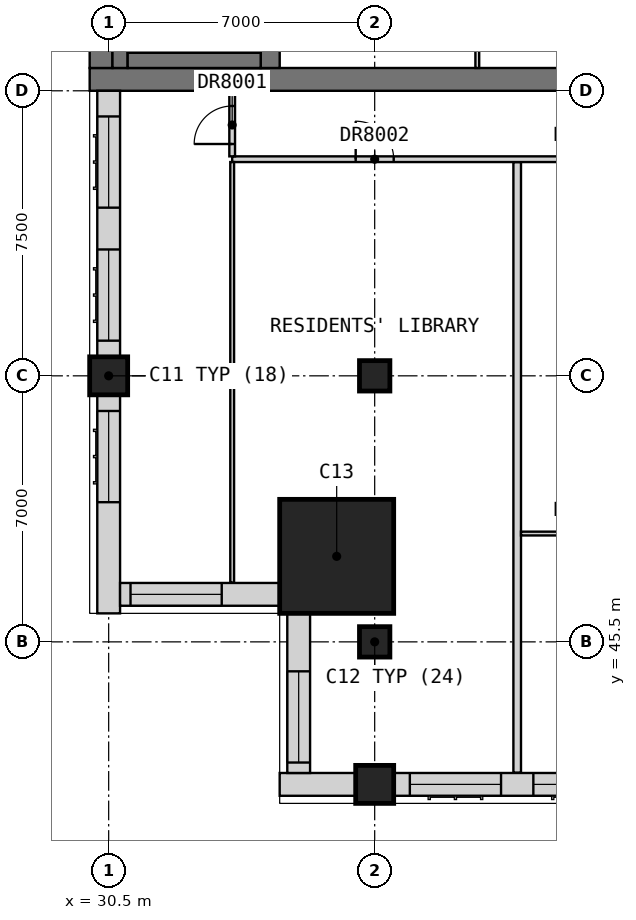
"""IFC4 building model, lengths in metres.
Left out: names, types, materials, properties, quantities, classifications, styles, units other than length and angle.
Written with IfcOpenShell. Run it as: python <this file> out.ifc"""

import sys

from ifc_helpers import new_model, si_unit, direction, frame, frame_2d, origin, origin_2d, place, context, subcontext, project, spatial, rectangle, extrude, element, fill, save


model = new_model("IFC4")
c1 = context("Model", 3, precision=1e-05, world=origin(), true_north=direction((0.0, 1.0)))
c2 = subcontext(c1, "Body", "Model", "MODEL_VIEW")
j1 = project(units=[si_unit("LENGTHUNIT", "METRE"), si_unit("PLANEANGLEUNIT", "RADIAN")], contexts=[c1])
p1 = place(None, origin())
s1 = spatial("IfcSite", under=j1, at=p1, CompositionType="ELEMENT")
p2 = place(p1, origin())
s2 = spatial("IfcBuilding", under=s1, at=p2, CompositionType="ELEMENT")
p3 = place(p2, frame((0.0, 0.0, 233.7)))
s3 = spatial("IfcBuildingStorey", under=s2, at=p3, CompositionType="ELEMENT", Elevation=233.7)
for number, where, z_axis, x_axis in (
    (1, (37.5, 41.75, 0.0), (0.0, 0.0, 1.0), (1.0, 0.0, 0.0)),
    (2, (30.5, 52.5, 0.0), (0.0, 0.0, 1.0), (1.0, 0.0, 0.0)),
):
    element("IfcColumn", number, at=place(p3, frame(where, z_axis=z_axis, x_axis=x_axis)), inside=s3, PredefinedType="COLUMN", context=c2, shape_type="SweptSolid", body=[
        extrude(rectangle(XDim=1.0, YDim=1.0, at=origin_2d()), origin(), (0.0, 0.0, 1.0), 3.5),
    ])
for number, where, z_axis, x_axis in (
    (3, (37.5, 45.5, 0.0), (0.0, 0.0, 1.0), (1.0, 0.0, 0.0)),
    (4, (37.5, 52.5, 0.0), (0.0, 0.0, 1.0), (1.0, 0.0, 0.0)),
):
    element("IfcColumn", number, at=place(p3, frame(where, z_axis=z_axis, x_axis=x_axis)), inside=s3, PredefinedType="COLUMN", context=c2, shape_type="SweptSolid", body=[
        extrude(rectangle(XDim=0.8, YDim=0.8, at=origin_2d()), origin(), (0.0, 0.0, 1.0), 3.5),
    ])
p4 = place(p3, frame((36.5, 47.75, 0.0), z_axis=(0.0, 0.0, 1.0), x_axis=(1.0, 0.0, 0.0)))
e5 = element("IfcColumn", 5, at=p4, inside=s3, PredefinedType="COLUMN", context=c2, shape_type="SweptSolid", body=[
    extrude(rectangle(XDim=3.0, YDim=3.0, at=origin_2d()), origin(), (0.0, 0.0, 1.0), 3.5),
])
p5 = place(p3, frame((30.0, 60.3, 0.0), z_axis=(0.0, 0.0, 1.0), x_axis=(1.0, 0.0, 0.0)))
e6 = element("IfcWall", 6, at=p5, inside=s3, PredefinedType="SHEAR", context=c2, shape_type="SweptSolid", body=[
    extrude(rectangle(XDim=30.0, YDim=0.6, at=frame_2d((15.0, 0.0))), origin(), (0.0, 0.0, 1.0), 3.5),
])
p6 = place(p5, frame((21.9, 0.0, 0.0)))
e7 = element("IfcOpeningElement", 7, at=p6, cuts=e6, PredefinedType="OPENING", context=c2, shape_type="SweptSolid", body=[
    extrude(rectangle(XDim=1.8, YDim=2.1, at=frame_2d((0.9, 1.05))), frame((0.0, 0.31, 0.0), z_axis=(0.0, -1.0, 0.0), x_axis=(1.0, 0.0, 0.0)), (0.0, 0.0, 1.0), 0.62),
])
p7 = place(p5, frame((26.5, 0.0, 0.0)))
e8 = element("IfcOpeningElement", 8, at=p7, cuts=e6, PredefinedType="OPENING", context=c2, shape_type="SweptSolid", body=[
    extrude(rectangle(XDim=1.2, YDim=2.1, at=frame_2d((0.6, 1.05))), frame((0.0, 0.31, 0.0), z_axis=(0.0, -1.0, 0.0), x_axis=(1.0, 0.0, 0.0)), (0.0, 0.0, 1.0), 0.62),
])
p8 = place(p3, frame((30.3, 60.6, 0.0), z_axis=(0.0, 0.0, 1.0), x_axis=(0.0, 1.0, 0.0)))
e9 = element("IfcWall", 9, at=p8, inside=s3, PredefinedType="SHEAR", context=c2, shape_type="SweptSolid", body=[
    extrude(rectangle(XDim=21.3, YDim=0.6, at=frame_2d((10.65, 0.0))), origin(), (0.0, 0.0, 1.0), 3.5),
])
p9 = place(p3, frame((34.75, 60.6, 0.0), z_axis=(0.0, 0.0, 1.0), x_axis=(0.0, 1.0, 0.0)))
e10 = element("IfcWall", 10, at=p9, inside=s3, PredefinedType="SHEAR", context=c2, shape_type="SweptSolid", body=[
    extrude(rectangle(XDim=3.6, YDim=0.5, at=frame_2d((1.8, 0.0))), origin(), (0.0, 0.0, 1.0), 3.5),
])
p10 = place(p3, frame((35.0, 41.75, 0.0), z_axis=(0.0, 0.0, 1.0), x_axis=(1.0, 0.0, 0.0)))
e11 = element("IfcWall", 11, at=p10, inside=s3, PredefinedType="SOLIDWALL", context=c2, shape_type="SweptSolid", body=[
    extrude(rectangle(XDim=2.0, YDim=0.6, at=frame_2d((1.0, 0.0))), origin(), (0.0, 0.0, 1.0), 3.25),
])
p11 = place(p3, frame((38.0, 41.75, 0.0), z_axis=(0.0, 0.0, 1.0), x_axis=(1.0, 0.0, 0.0)))
e12 = element("IfcWall", 12, at=p11, inside=s3, PredefinedType="SOLIDWALL", context=c2, shape_type="SweptSolid", body=[
    extrude(rectangle(XDim=6.5, YDim=0.6, at=frame_2d((3.25, 0.0))), origin(), (0.0, 0.0, 1.0), 2.75),
])
p12 = place(p11, frame((0.425, 0.0, 0.8)))
e13 = element("IfcOpeningElement", 13, at=p12, cuts=e12, PredefinedType="OPENING", context=c2, shape_type="SweptSolid", body=[
    extrude(rectangle(XDim=2.4, YDim=1.8, at=frame_2d((1.2, 0.9))), frame((0.0, 0.31, 0.0), z_axis=(0.0, -1.0, 0.0), x_axis=(1.0, 0.0, 0.0)), (0.0, 0.0, 1.0), 0.62),
])
p13 = place(p11, frame((3.675, 0.0, 0.8)))
e14 = element("IfcOpeningElement", 14, at=p13, cuts=e12, PredefinedType="OPENING", context=c2, shape_type="SweptSolid", body=[
    extrude(rectangle(XDim=2.4, YDim=1.8, at=frame_2d((1.2, 0.9))), frame((0.0, 0.31, 0.0), z_axis=(0.0, -1.0, 0.0), x_axis=(1.0, 0.0, 0.0)), (0.0, 0.0, 1.0), 0.62),
])
p14 = place(p3, frame((30.5, 60.0, 0.0), z_axis=(0.0, 0.0, 1.0), x_axis=(0.0, -1.0, 0.0)))
e15 = element("IfcWall", 15, at=p14, inside=s3, PredefinedType="SOLIDWALL", context=c2, shape_type="SweptSolid", body=[
    extrude(rectangle(XDim=7.0, YDim=0.6, at=frame_2d((3.5, 0.0))), origin(), (0.0, 0.0, 1.0), 3.25),
])
p15 = place(p14, frame((4.175, 0.0, 0.8)))
e16 = element("IfcOpeningElement", 16, at=p15, cuts=e15, PredefinedType="OPENING", context=c2, shape_type="SweptSolid", body=[
    extrude(rectangle(XDim=2.4, YDim=1.8, at=frame_2d((1.2, 0.9))), frame((0.0, 0.31, 0.0), z_axis=(0.0, -1.0, 0.0), x_axis=(1.0, 0.0, 0.0)), (0.0, 0.0, 1.0), 0.62),
])
p16 = place(p14, frame((0.675, 0.0, 0.8)))
e17 = element("IfcOpeningElement", 17, at=p16, cuts=e15, PredefinedType="OPENING", context=c2, shape_type="SweptSolid", body=[
    extrude(rectangle(XDim=2.4, YDim=1.8, at=frame_2d((1.2, 0.9))), frame((0.0, 0.31, 0.0), z_axis=(0.0, -1.0, 0.0), x_axis=(1.0, 0.0, 0.0)), (0.0, 0.0, 1.0), 0.62),
])
p17 = place(p3, frame((30.5, 52.0, 0.0), z_axis=(0.0, 0.0, 1.0), x_axis=(0.0, -1.0, 0.0)))
e18 = element("IfcWall", 18, at=p17, inside=s3, PredefinedType="SOLIDWALL", context=c2, shape_type="SweptSolid", body=[
    extrude(rectangle(XDim=5.75, YDim=0.6, at=frame_2d((2.875, 0.0))), origin(), (0.0, 0.0, 1.0), 2.75),
])
p18 = place(p17, frame((0.425, 0.0, 0.8)))
e19 = element("IfcOpeningElement", 19, at=p18, cuts=e18, PredefinedType="OPENING", context=c2, shape_type="SweptSolid", body=[
    extrude(rectangle(XDim=2.4, YDim=1.8, at=frame_2d((1.2, 0.9))), frame((0.0, 0.31, 0.0), z_axis=(0.0, -1.0, 0.0), x_axis=(1.0, 0.0, 0.0)), (0.0, 0.0, 1.0), 0.62),
])
p19 = place(p3, frame((30.8, 46.75, 0.0), z_axis=(0.0, 0.0, 1.0), x_axis=(1.0, 0.0, 0.0)))
e20 = element("IfcWall", 20, at=p19, inside=s3, PredefinedType="SOLIDWALL", context=c2, shape_type="SweptSolid", body=[
    extrude(rectangle(XDim=4.2, YDim=0.6, at=frame_2d((2.1, 0.0))), origin(), (0.0, 0.0, 1.0), 3.25),
])
p20 = place(p19, frame((0.275, 0.0, 0.8)))
e21 = element("IfcOpeningElement", 21, at=p20, cuts=e20, PredefinedType="OPENING", context=c2, shape_type="SweptSolid", body=[
    extrude(rectangle(XDim=2.4, YDim=1.8, at=frame_2d((1.2, 0.9))), frame((0.0, 0.31, 0.0), z_axis=(0.0, -1.0, 0.0), x_axis=(1.0, 0.0, 0.0)), (0.0, 0.0, 1.0), 0.62),
])
p21 = place(p3, frame((35.5, 46.25, 0.0), z_axis=(0.0, 0.0, 1.0), x_axis=(0.0, -1.0, 0.0)))
e22 = element("IfcWall", 22, at=p21, inside=s3, PredefinedType="SOLIDWALL", context=c2, shape_type="SweptSolid", body=[
    extrude(rectangle(XDim=4.2, YDim=0.6, at=frame_2d((2.1, 0.0))), origin(), (0.0, 0.0, 1.0), 3.25),
])
p22 = place(p21, frame((1.525, 0.0, 0.8)))
e23 = element("IfcOpeningElement", 23, at=p22, cuts=e22, PredefinedType="OPENING", context=c2, shape_type="SweptSolid", body=[
    extrude(rectangle(XDim=2.4, YDim=1.8, at=frame_2d((1.2, 0.9))), frame((0.0, 0.31, 0.0), z_axis=(0.0, -1.0, 0.0), x_axis=(1.0, 0.0, 0.0)), (0.0, 0.0, 1.0), 0.62),
])
p23 = place(p3, frame((40.2, 60.6, 0.0), z_axis=(0.0, 0.0, 1.0), x_axis=(0.0, 1.0, 0.0)))
e24 = element("IfcWall", 24, at=p23, inside=s3, PredefinedType="PARTITIONING", context=c2, shape_type="SweptSolid", body=[
    extrude(rectangle(XDim=3.4, YDim=0.1, at=frame_2d((1.7, 0.0))), origin(), (0.0, 0.0, 1.0), 3.25),
])
p24 = place(p3, frame((30.8, 60.6, 0.0), z_axis=(0.0, 0.0, 1.0), x_axis=(0.0, 1.0, 0.0)))
e25 = element("IfcWall", 25, at=p24, inside=s3, PredefinedType="SOLIDWALL", context=c2, shape_type="SweptSolid", body=[
    extrude(rectangle(XDim=21.3, YDim=0.4, at=frame_2d((10.65, 0.0))), origin(), (0.0, 0.0, 1.0), 3.25),
])
p25 = place(p3, frame((31.0, 60.8, 0.0), z_axis=(0.0, 0.0, 1.0), x_axis=(1.0, 0.0, 0.0)))
e26 = element("IfcWall", 26, at=p25, inside=s3, PredefinedType="SOLIDWALL", context=c2, shape_type="SweptSolid", body=[
    extrude(rectangle(XDim=3.5, YDim=0.4, at=frame_2d((1.75, 0.0))), origin(), (0.0, 0.0, 1.0), 3.25),
])
p26 = place(p3, frame((41.25, 42.06, 0.0), z_axis=(0.0, 0.0, 1.0), x_axis=(0.0, 1.0, 0.0)))
e27 = element("IfcWall", 27, at=p26, inside=s3, PredefinedType="PARTITIONING", context=c2, shape_type="SweptSolid", body=[
    extrude(rectangle(XDim=16.065, YDim=0.2, at=frame_2d((8.032, 0.0))), origin(), (0.0, 0.0, 1.0), 3.25),
])
p27 = place(p3, frame((33.75, 58.2, 0.0), z_axis=(0.0, 0.0, 1.0), x_axis=(1.0, 0.0, 0.0)))
e28 = element("IfcWall", 28, at=p27, inside=s3, PredefinedType="PARTITIONING", context=c2, shape_type="SweptSolid", body=[
    extrude(rectangle(XDim=28.05, YDim=0.15, at=frame_2d((14.025, 0.0))), origin(), (0.0, 0.0, 1.0), 3.25),
])
p28 = place(p27, frame((3.25, 0.0, 0.0)))
e29 = element("IfcOpeningElement", 29, at=p28, cuts=e28, PredefinedType="OPENING", context=c2, shape_type="SweptSolid", body=[
    extrude(rectangle(XDim=1.0, YDim=2.1, at=frame_2d((0.5, 1.05))), frame((0.0, 0.085, 0.0), z_axis=(0.0, -1.0, 0.0), x_axis=(1.0, 0.0, 0.0)), (0.0, 0.0, 1.0), 0.17),
])
p29 = place(p27, frame((8.925, 0.0, 0.0)))
e30 = element("IfcOpeningElement", 30, at=p29, cuts=e28, PredefinedType="OPENING", context=c2, shape_type="SweptSolid", body=[
    extrude(rectangle(XDim=0.9, YDim=2.1, at=frame_2d((0.45, 1.05))), frame((0.0, 0.085, 0.0), z_axis=(0.0, -1.0, 0.0), x_axis=(1.0, 0.0, 0.0)), (0.0, 0.0, 1.0), 0.17),
])
p30 = place(p27, frame((20.175, 0.0, 0.0)))
e31 = element("IfcOpeningElement", 31, at=p30, cuts=e28, PredefinedType="OPENING", context=c2, shape_type="SweptSolid", body=[
    extrude(rectangle(XDim=0.9, YDim=2.1, at=frame_2d((0.45, 1.05))), frame((0.0, 0.085, 0.0), z_axis=(0.0, -1.0, 0.0), x_axis=(1.0, 0.0, 0.0)), (0.0, 0.0, 1.0), 0.17),
])
p31 = place(p27, frame((26.7, 0.0, 0.0)))
e32 = element("IfcOpeningElement", 32, at=p31, cuts=e28, PredefinedType="OPENING", context=c2, shape_type="SweptSolid", body=[
    extrude(rectangle(XDim=0.9, YDim=2.1, at=frame_2d((0.45, 1.05))), frame((0.0, 0.085, 0.0), z_axis=(0.0, -1.0, 0.0), x_axis=(1.0, 0.0, 0.0)), (0.0, 0.0, 1.0), 0.17),
])
p32 = place(p3, frame((33.75, 58.275, 0.0), z_axis=(0.0, 0.0, 1.0), x_axis=(0.0, 1.0, 0.0)))
e33 = element("IfcWall", 33, at=p32, inside=s3, PredefinedType="PARTITIONING", context=c2, shape_type="SweptSolid", body=[
    extrude(rectangle(XDim=1.725, YDim=0.15, at=frame_2d((0.863, 0.0))), origin(), (0.0, 0.0, 1.0), 3.25),
])
p33 = place(p32, frame((0.325, 0.0, 0.0)))
e34 = element("IfcOpeningElement", 34, at=p33, cuts=e33, PredefinedType="OPENING", context=c2, shape_type="SweptSolid", body=[
    extrude(rectangle(XDim=1.0, YDim=2.1, at=frame_2d((0.5, 1.05))), frame((0.0, 0.085, 0.0), z_axis=(0.0, -1.0, 0.0), x_axis=(1.0, 0.0, 0.0)), (0.0, 0.0, 1.0), 0.17),
])
p34 = place(p3, frame((41.35, 48.35, 0.0), z_axis=(0.0, 0.0, 1.0), x_axis=(1.0, 0.0, 0.0)))
e35 = element("IfcWall", 35, at=p34, inside=s3, PredefinedType="PARTITIONING", context=c2, shape_type="SweptSolid", body=[
    extrude(rectangle(XDim=18.55, YDim=0.1, at=frame_2d((9.275, 0.0))), origin(), (0.0, 0.0, 1.0), 3.25),
])
p35 = place(p34, frame((1.325, 0.0, 0.0)))
e36 = element("IfcOpeningElement", 36, at=p35, cuts=e35, PredefinedType="OPENING", context=c2, shape_type="SweptSolid", body=[
    extrude(rectangle(XDim=0.9, YDim=2.1, at=frame_2d((0.45, 1.05))), frame((0.0, 0.06, 0.0), z_axis=(0.0, -1.0, 0.0), x_axis=(1.0, 0.0, 0.0)), (0.0, 0.0, 1.0), 0.12),
])
p36 = place(p34, frame((8.825, 0.0, 0.0)))
e37 = element("IfcOpeningElement", 37, at=p36, cuts=e35, PredefinedType="OPENING", context=c2, shape_type="SweptSolid", body=[
    extrude(rectangle(XDim=0.9, YDim=2.1, at=frame_2d((0.45, 1.05))), frame((0.0, 0.06, 0.0), z_axis=(0.0, -1.0, 0.0), x_axis=(1.0, 0.0, 0.0)), (0.0, 0.0, 1.0), 0.12),
])
p37 = place(p34, frame((12.575, 0.0, 0.0)))
e38 = element("IfcOpeningElement", 38, at=p37, cuts=e35, PredefinedType="OPENING", context=c2, shape_type="SweptSolid", body=[
    extrude(rectangle(XDim=0.9, YDim=2.1, at=frame_2d((0.45, 1.05))), frame((0.0, 0.06, 0.0), z_axis=(0.0, -1.0, 0.0), x_axis=(1.0, 0.0, 0.0)), (0.0, 0.0, 1.0), 0.12),
])
p38 = place(p3, frame((33.75, 47.06, 0.0), z_axis=(0.0, 0.0, 1.0), x_axis=(0.0, 1.0, 0.0)))
e39 = element("IfcWall", 39, at=p38, inside=s3, PredefinedType="PARTITIONING", context=c2, shape_type="SweptSolid", body=[
    extrude(rectangle(XDim=11.065, YDim=0.1, at=frame_2d((5.532, 0.0))), origin(), (0.0, 0.0, 1.0), 3.25),
])
p39 = place(p12, origin())
e40 = element("IfcWindow", 40, at=p39, inside=s3, PartitioningType="SINGLE_PANEL", PredefinedType="WINDOW", context=c2, shape_type="SweptSolid", body=[
    extrude(rectangle(XDim=2.4, YDim=1.8, at=frame_2d((1.2, 0.9))), frame((0.0, -0.07, 0.0), z_axis=(0.0, -1.0, 0.0), x_axis=(1.0, 0.0, 0.0)), (0.0, 0.0, 1.0), 0.06),
])
fill(e13, e40)
p40 = place(p13, origin())
e41 = element("IfcWindow", 41, at=p40, inside=s3, PartitioningType="SINGLE_PANEL", PredefinedType="WINDOW", context=c2, shape_type="SweptSolid", body=[
    extrude(rectangle(XDim=2.4, YDim=1.8, at=frame_2d((1.2, 0.9))), frame((0.0, -0.07, 0.0), z_axis=(0.0, -1.0, 0.0), x_axis=(1.0, 0.0, 0.0)), (0.0, 0.0, 1.0), 0.06),
])
fill(e14, e41)
p41 = place(p15, origin())
e42 = element("IfcWindow", 42, at=p41, inside=s3, PartitioningType="SINGLE_PANEL", PredefinedType="WINDOW", context=c2, shape_type="SweptSolid", body=[
    extrude(rectangle(XDim=2.4, YDim=1.8, at=frame_2d((1.2, 0.9))), frame((0.0, -0.07, 0.0), z_axis=(0.0, -1.0, 0.0), x_axis=(1.0, 0.0, 0.0)), (0.0, 0.0, 1.0), 0.06),
])
fill(e16, e42)
p42 = place(p16, origin())
e43 = element("IfcWindow", 43, at=p42, inside=s3, PartitioningType="SINGLE_PANEL", PredefinedType="WINDOW", context=c2, shape_type="SweptSolid", body=[
    extrude(rectangle(XDim=2.4, YDim=1.8, at=frame_2d((1.2, 0.9))), frame((0.0, -0.07, 0.0), z_axis=(0.0, -1.0, 0.0), x_axis=(1.0, 0.0, 0.0)), (0.0, 0.0, 1.0), 0.06),
])
fill(e17, e43)
p43 = place(p18, origin())
e44 = element("IfcWindow", 44, at=p43, inside=s3, PartitioningType="SINGLE_PANEL", PredefinedType="WINDOW", context=c2, shape_type="SweptSolid", body=[
    extrude(rectangle(XDim=2.4, YDim=1.8, at=frame_2d((1.2, 0.9))), frame((0.0, -0.07, 0.0), z_axis=(0.0, -1.0, 0.0), x_axis=(1.0, 0.0, 0.0)), (0.0, 0.0, 1.0), 0.06),
])
fill(e19, e44)
p44 = place(p20, origin())
e45 = element("IfcWindow", 45, at=p44, inside=s3, PartitioningType="SINGLE_PANEL", PredefinedType="WINDOW", context=c2, shape_type="SweptSolid", body=[
    extrude(rectangle(XDim=2.4, YDim=1.8, at=frame_2d((1.2, 0.9))), frame((0.0, -0.07, 0.0), z_axis=(0.0, -1.0, 0.0), x_axis=(1.0, 0.0, 0.0)), (0.0, 0.0, 1.0), 0.06),
])
fill(e21, e45)
p45 = place(p22, origin())
e46 = element("IfcWindow", 46, at=p45, inside=s3, PartitioningType="SINGLE_PANEL", PredefinedType="WINDOW", context=c2, shape_type="SweptSolid", body=[
    extrude(rectangle(XDim=2.4, YDim=1.8, at=frame_2d((1.2, 0.9))), frame((0.0, -0.07, 0.0), z_axis=(0.0, -1.0, 0.0), x_axis=(1.0, 0.0, 0.0)), (0.0, 0.0, 1.0), 0.06),
])
fill(e23, e46)
p46 = place(p33, origin())
e47 = element("IfcDoor", 47, at=p46, inside=s3, OperationType="SINGLE_SWING_RIGHT", PredefinedType="DOOR", context=c2, shape_type="SweptSolid", body=[
    extrude(rectangle(XDim=1.0, YDim=2.1, at=frame_2d((0.5, 1.05))), frame((0.0, 0.025, 0.0), z_axis=(0.0, -1.0, 0.0), x_axis=(1.0, 0.0, 0.0)), (0.0, 0.0, 1.0), 0.05),
])
fill(e34, e47)
p47 = place(p28, origin())
e48 = element("IfcDoor", 48, at=p47, inside=s3, OperationType="SINGLE_SWING_RIGHT", PredefinedType="DOOR", context=c2, shape_type="SweptSolid", body=[
    extrude(rectangle(XDim=1.0, YDim=2.1, at=frame_2d((0.5, 1.05))), frame((0.0, 0.025, 0.0), z_axis=(0.0, -1.0, 0.0), x_axis=(1.0, 0.0, 0.0)), (0.0, 0.0, 1.0), 0.05),
])
fill(e29, e48)
save(model, sys.argv[1])
